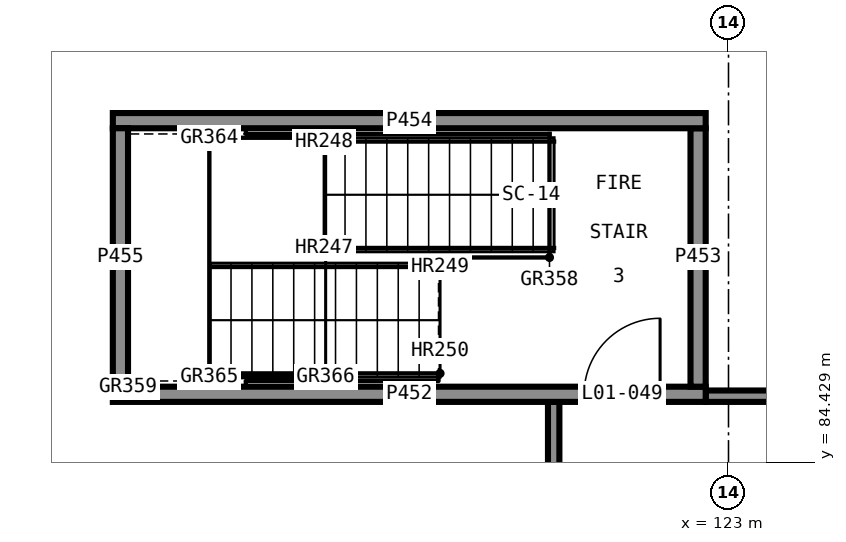
"""IFC4 building model, lengths in metres.
Left out: names, types, materials, properties, quantities, classifications, styles, units other than length and angle.
Written with IfcOpenShell. Run it as: python <this file> out.ifc"""

import sys

from ifc_helpers import new_model, si_unit, direction, frame, frame_2d, origin, place, context, subcontext, project, spatial, rectangle, extrude, element, fill, save


model = new_model("IFC4")
c1 = context("Model", 3, precision=1e-05, world=origin(), true_north=direction((0.0, 1.0)))
c2 = subcontext(c1, "Body", "Model", "MODEL_VIEW")
j1 = project(units=[si_unit("LENGTHUNIT", "METRE"), si_unit("PLANEANGLEUNIT", "RADIAN")], contexts=[c1])
p1 = place(None, origin())
s1 = spatial("IfcSite", under=j1, at=p1, CompositionType="ELEMENT")
p2 = place(p1, origin())
s2 = spatial("IfcBuilding", under=s1, at=p2, CompositionType="ELEMENT")
p3 = place(p2, frame((0.0, 0.0, 5.5)))
s3 = spatial("IfcBuildingStorey", under=s2, at=p3, CompositionType="ELEMENT", Elevation=5.5)
p4 = place(p3, frame((114.9, 85.325, 0.0), z_axis=(0.0, 0.0, 1.0), x_axis=(1.0, 0.0, 0.0)))
e1 = element("IfcWall", 1, at=p4, inside=s3, PredefinedType="SHEAR", context=c2, shape_type="SweptSolid", body=[
    extrude(rectangle(XDim=7.8, YDim=0.2, at=frame_2d((3.9, 0.0))), origin(), (0.0, 0.0, 1.0), 3.75),
])
p5 = place(p4, frame((6.2, 0.0, 0.0)))
e2 = element("IfcOpeningElement", 2, at=p5, cuts=e1, PredefinedType="OPENING", context=c2, shape_type="SweptSolid", body=[
    extrude(rectangle(XDim=1.0, YDim=2.1, at=frame_2d((0.5, 1.05))), frame((0.0, 0.11, 0.0), z_axis=(0.0, -1.0, 0.0), x_axis=(1.0, 0.0, 0.0)), (0.0, 0.0, 1.0), 0.22),
])
p6 = place(p3, frame((122.6, 85.425, 0.0), z_axis=(0.0, 0.0, 1.0), x_axis=(0.0, 1.0, 0.0)))
e3 = element("IfcWall", 3, at=p6, inside=s3, PredefinedType="SHEAR", context=c2, shape_type="SweptSolid", body=[
    extrude(rectangle(XDim=3.4, YDim=0.2, at=frame_2d((1.7, 0.0))), origin(), (0.0, 0.0, 1.0), 3.75),
])
p7 = place(p3, frame((122.7, 88.925, 0.0), z_axis=(0.0, 0.0, 1.0), x_axis=(-1.0, 0.0, 0.0)))
e4 = element("IfcWall", 4, at=p7, inside=s3, PredefinedType="SHEAR", context=c2, shape_type="SweptSolid", body=[
    extrude(rectangle(XDim=7.8, YDim=0.2, at=frame_2d((3.9, 0.0))), origin(), (0.0, 0.0, 1.0), 3.75),
])
p8 = place(p3, frame((115.0, 88.825, 0.0), z_axis=(0.0, 0.0, 1.0), x_axis=(0.0, -1.0, 0.0)))
e5 = element("IfcWall", 5, at=p8, inside=s3, PredefinedType="SHEAR", context=c2, shape_type="SweptSolid", body=[
    extrude(rectangle(XDim=3.4, YDim=0.2, at=frame_2d((1.7, 0.0))), origin(), (0.0, 0.0, 1.0), 3.75),
])
p9 = place(p3, frame((120.7, 62.7, 0.0), z_axis=(0.0, 0.0, 1.0), x_axis=(0.0, 1.0, 0.0)))
e6 = element("IfcWall", 6, at=p9, inside=s3, PredefinedType="PARTITIONING", context=c2, shape_type="SweptSolid", body=[
    extrude(rectangle(XDim=22.525, YDim=0.15, at=frame_2d((11.263, 0.0))), origin(), (0.0, 0.0, 1.0), 3.75),
])
p10 = place(p3, frame((122.7, 85.3, 0.0), z_axis=(0.0, 0.0, 1.0), x_axis=(1.0, 0.0, 0.0)))
e7 = element("IfcWall", 7, at=p10, inside=s3, PredefinedType="PARTITIONING", context=c2, shape_type="SweptSolid", body=[
    extrude(rectangle(XDim=9.9, YDim=0.15, at=frame_2d((4.95, 0.0))), origin(), (0.0, 0.0, 1.0), 3.75),
])
p11 = place(p5, origin())
e8 = element("IfcDoor", 8, at=p11, inside=s3, OperationType="SINGLE_SWING_LEFT", PredefinedType="DOOR", context=c2, shape_type="SweptSolid", body=[
    extrude(rectangle(XDim=1.0, YDim=2.1, at=frame_2d((0.5, 1.05))), frame((0.0, 0.025, 0.0), z_axis=(0.0, -1.0, 0.0), x_axis=(1.0, 0.0, 0.0)), (0.0, 0.0, 1.0), 0.05),
])
fill(e2, e8)
save(model, sys.argv[1])
